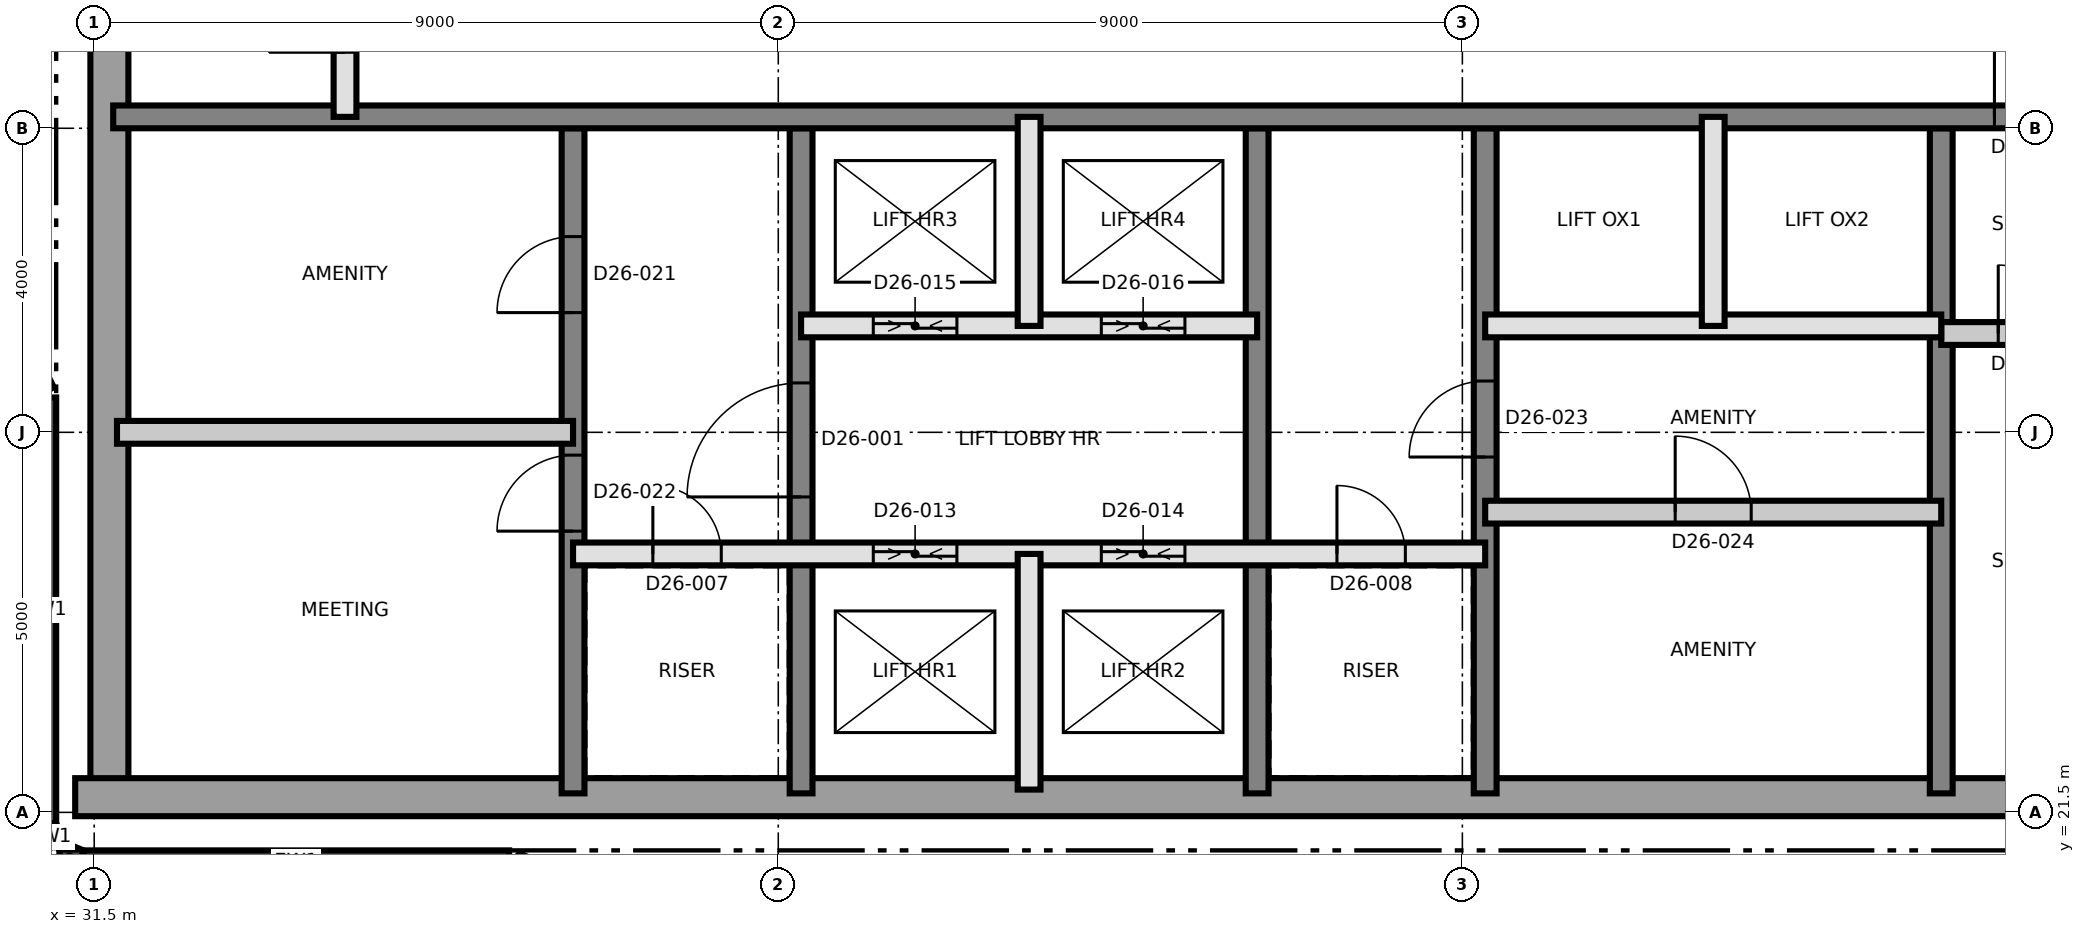
"""IFC4 building model, lengths in metres.
Left out: names, types, materials, properties, quantities, classifications, styles, units other than length and angle.
Written with IfcOpenShell. Run it as: python <this file> out.ifc"""

import sys

from ifc_helpers import new_model, si_unit, direction, frame, frame_2d, origin, place, context, subcontext, project, spatial, rectangle, extrude, element, fill, save


model = new_model("IFC4")
c1 = context("Model", 3, precision=1e-05, world=origin(), true_north=direction((0.0, 1.0)))
c2 = subcontext(c1, "Body", "Model", "MODEL_VIEW")
j1 = project(units=[si_unit("LENGTHUNIT", "METRE"), si_unit("PLANEANGLEUNIT", "RADIAN")], contexts=[c1])
p1 = place(None, origin())
s1 = spatial("IfcSite", under=j1, at=p1, CompositionType="ELEMENT")
p2 = place(p1, origin())
s2 = spatial("IfcBuilding", under=s1, at=p2, CompositionType="ELEMENT")
p3 = place(p2, frame((0.0, 0.0, 232.8)))
s3 = spatial("IfcBuildingStorey", under=s2, at=p3, CompositionType="ELEMENT", Elevation=232.8)
p4 = place(p3, frame((31.7, 21.75, 0.0), z_axis=(0.0, 0.0, 1.0), x_axis=(0.0, 1.0, 0.0)))
e1 = element("IfcWall", 1, at=p4, inside=s3, PredefinedType="SHEAR", context=c2, shape_type="SweptSolid", body=[
    extrude(rectangle(XDim=17.5, YDim=0.5, at=frame_2d((8.75, 0.0))), origin(), (0.0, 0.0, 1.0), 3.7),
])
p5 = place(p3, frame((31.25, 21.7, 0.0), z_axis=(0.0, 0.0, 1.0), x_axis=(1.0, 0.0, 0.0)))
e2 = element("IfcWall", 2, at=p5, inside=s3, PredefinedType="SHEAR", context=c2, shape_type="SweptSolid", body=[
    extrude(rectangle(XDim=27.0, YDim=0.5, at=frame_2d((13.5, 0.0))), origin(), (0.0, 0.0, 1.0), 3.7),
])
p6 = place(p3, frame((37.8, 21.75, 0.0), z_axis=(0.0, 0.0, 1.0), x_axis=(0.0, 1.0, 0.0)))
e3 = element("IfcWall", 3, at=p6, inside=s3, PredefinedType="SHEAR", context=c2, shape_type="SweptSolid", body=[
    extrude(rectangle(XDim=8.75, YDim=0.3, at=frame_2d((4.375, 0.0))), origin(), (0.0, 0.0, 1.0), 3.7),
])
p7 = place(p6, frame((6.325, 0.0, 0.0)))
e4 = element("IfcOpeningElement", 4, at=p7, cuts=e3, PredefinedType="OPENING", context=c2, shape_type="SweptSolid", body=[
    extrude(rectangle(XDim=1.0, YDim=2.1, at=frame_2d((0.5, 1.05))), frame((0.0, 0.16, 0.0), z_axis=(0.0, -1.0, 0.0), x_axis=(1.0, 0.0, 0.0)), (0.0, 0.0, 1.0), 0.32),
])
p8 = place(p6, frame((3.45, 0.0, 0.0)))
e5 = element("IfcOpeningElement", 5, at=p8, cuts=e3, PredefinedType="OPENING", context=c2, shape_type="SweptSolid", body=[
    extrude(rectangle(XDim=1.0, YDim=2.1, at=frame_2d((0.5, 1.05))), frame((0.0, 0.16, 0.0), z_axis=(0.0, -1.0, 0.0), x_axis=(1.0, 0.0, 0.0)), (0.0, 0.0, 1.0), 0.32),
])
p9 = place(p3, frame((40.8, 21.75, 0.0), z_axis=(0.0, 0.0, 1.0), x_axis=(0.0, 1.0, 0.0)))
e6 = element("IfcWall", 6, at=p9, inside=s3, PredefinedType="SHEAR", context=c2, shape_type="SweptSolid", body=[
    extrude(rectangle(XDim=8.75, YDim=0.3, at=frame_2d((4.375, 0.0))), origin(), (0.0, 0.0, 1.0), 3.7),
])
p10 = place(p9, frame((3.9, 0.0, 0.0)))
e7 = element("IfcOpeningElement", 7, at=p10, cuts=e6, PredefinedType="OPENING", context=c2, shape_type="SweptSolid", body=[
    extrude(rectangle(XDim=1.5, YDim=2.1, at=frame_2d((0.75, 1.05))), frame((0.0, 0.16, 0.0), z_axis=(0.0, -1.0, 0.0), x_axis=(1.0, 0.0, 0.0)), (0.0, 0.0, 1.0), 0.32),
])
p11 = place(p3, frame((46.8, 21.75, 0.0), z_axis=(0.0, 0.0, 1.0), x_axis=(0.0, 1.0, 0.0)))
e8 = element("IfcWall", 8, at=p11, inside=s3, PredefinedType="SHEAR", context=c2, shape_type="SweptSolid", body=[
    extrude(rectangle(XDim=8.75, YDim=0.3, at=frame_2d((4.375, 0.0))), origin(), (0.0, 0.0, 1.0), 3.7),
])
p12 = place(p3, frame((49.8, 21.75, 0.0), z_axis=(0.0, 0.0, 1.0), x_axis=(0.0, 1.0, 0.0)))
e9 = element("IfcWall", 9, at=p12, inside=s3, PredefinedType="SHEAR", context=c2, shape_type="SweptSolid", body=[
    extrude(rectangle(XDim=8.75, YDim=0.3, at=frame_2d((4.375, 0.0))), origin(), (0.0, 0.0, 1.0), 3.7),
])
p13 = place(p12, frame((4.425, 0.0, 0.0)))
e10 = element("IfcOpeningElement", 10, at=p13, cuts=e9, PredefinedType="OPENING", context=c2, shape_type="SweptSolid", body=[
    extrude(rectangle(XDim=1.0, YDim=2.1, at=frame_2d((0.5, 1.05))), frame((0.0, 0.16, 0.0), z_axis=(0.0, -1.0, 0.0), x_axis=(1.0, 0.0, 0.0)), (0.0, 0.0, 1.0), 0.32),
])
p14 = place(p3, frame((55.8, 21.75, 0.0), z_axis=(0.0, 0.0, 1.0), x_axis=(0.0, 1.0, 0.0)))
e11 = element("IfcWall", 11, at=p14, inside=s3, PredefinedType="SHEAR", context=c2, shape_type="SweptSolid", body=[
    extrude(rectangle(XDim=8.75, YDim=0.3, at=frame_2d((4.375, 0.0))), origin(), (0.0, 0.0, 1.0), 3.7),
])
p15 = place(p3, frame((31.75, 30.65, 0.0), z_axis=(0.0, 0.0, 1.0), x_axis=(1.0, 0.0, 0.0)))
e12 = element("IfcWall", 12, at=p15, inside=s3, PredefinedType="SHEAR", context=c2, shape_type="SweptSolid", body=[
    extrude(rectangle(XDim=26.5, YDim=0.3, at=frame_2d((13.25, 0.0))), origin(), (0.0, 0.0, 1.0), 3.7),
])
p16 = place(p15, frame((24.75, 0.0, 0.0)))
e13 = element("IfcOpeningElement", 13, at=p16, cuts=e12, PredefinedType="OPENING", context=c2, shape_type="SweptSolid", body=[
    extrude(rectangle(XDim=1.0, YDim=2.1, at=frame_2d((0.5, 1.05))), frame((0.0, 0.16, 0.0), z_axis=(0.0, -1.0, 0.0), x_axis=(1.0, 0.0, 0.0)), (0.0, 0.0, 1.0), 0.32),
])
p17 = place(p3, frame((30.85, 26.959, 0.0), z_axis=(0.0, 0.0, 1.0), x_axis=(0.0, -1.0, 0.0)))
e14 = element("IfcWall", 14, at=p17, inside=s3, PredefinedType="SOLIDWALL", context=c2, shape_type="SweptSolid", body=[
    extrude(rectangle(XDim=5.599, YDim=0.3, at=frame_2d((2.8, 0.0))), origin(), (0.0, 0.0, 1.0), 3.4),
])
for number, where, z_axis, x_axis in (
    (15, (30.861, 21.302, 0.0), (0.0, 0.0, 1.0), (0.383, -0.924, 0.0)),
    (16, (31.048, 20.967, 0.0), (0.0, 0.0, 1.0), (0.924, -0.383, 0.0)),
):
    element("IfcWall", number, at=place(p3, frame(where, z_axis=z_axis, x_axis=x_axis)), inside=s3, PredefinedType="SOLIDWALL", context=c2, shape_type="SweptSolid", body=[
        extrude(rectangle(XDim=0.275, YDim=0.3, at=frame_2d((0.138, 0.0))), origin(), (0.0, 0.0, 1.0), 3.4),
    ])
p18 = place(p3, frame((31.36, 20.85, 0.0), z_axis=(0.0, 0.0, 1.0), x_axis=(1.0, 0.0, 0.0)))
e17 = element("IfcWall", 17, at=p18, inside=s3, PredefinedType="SOLIDWALL", context=c2, shape_type="SweptSolid", body=[
    extrude(rectangle(XDim=5.599, YDim=0.3, at=frame_2d((2.8, 0.0))), origin(), (0.0, 0.0, 1.0), 3.4),
])
for number, where, z_axis, x_axis in (
    (18, (37.025, 20.834, 0.0), (0.0, 0.0, 1.0), (0.897, -0.442, 0.0)),
    (19, (30.216, 28.28, 0.0), (0.0, 0.0, 1.0), (0.442, -0.897, 0.0)),
):
    element("IfcWall", number, at=place(p3, frame(where, z_axis=z_axis, x_axis=x_axis)), inside=s3, PredefinedType="SOLIDWALL", context=c2, shape_type="SweptSolid", body=[
        extrude(rectangle(XDim=1.399, YDim=0.3, at=frame_2d((0.7, 0.0))), origin(), (0.0, 0.0, 1.0), 3.4),
    ])
p19 = place(p3, frame((37.8, 24.9, 0.0), z_axis=(0.0, 0.0, 1.0), x_axis=(1.0, 0.0, 0.0)))
e20 = element("IfcWall", 20, at=p19, inside=s3, PredefinedType="SOLIDWALL", context=c2, shape_type="SweptSolid", body=[
    extrude(rectangle(XDim=12.0, YDim=0.3, at=frame_2d((6.0, 0.0))), origin(), (0.0, 0.0, 1.0), 3.4),
])
p20 = place(p19, frame((1.05, 0.0, 0.0)))
e21 = element("IfcOpeningElement", 21, at=p20, cuts=e20, PredefinedType="OPENING", context=c2, shape_type="SweptSolid", body=[
    extrude(rectangle(XDim=0.9, YDim=2.1, at=frame_2d((0.45, 1.05))), frame((0.0, 0.16, 0.0), z_axis=(0.0, -1.0, 0.0), x_axis=(1.0, 0.0, 0.0)), (0.0, 0.0, 1.0), 0.32),
])
p21 = place(p19, frame((10.05, 0.0, 0.0)))
e22 = element("IfcOpeningElement", 22, at=p21, cuts=e20, PredefinedType="OPENING", context=c2, shape_type="SweptSolid", body=[
    extrude(rectangle(XDim=0.9, YDim=2.1, at=frame_2d((0.45, 1.05))), frame((0.0, 0.16, 0.0), z_axis=(0.0, -1.0, 0.0), x_axis=(1.0, 0.0, 0.0)), (0.0, 0.0, 1.0), 0.32),
])
p22 = place(p19, frame((3.95, 0.0, 0.0)))
e23 = element("IfcOpeningElement", 23, at=p22, cuts=e20, PredefinedType="OPENING", context=c2, shape_type="SweptSolid", body=[
    extrude(rectangle(XDim=1.1, YDim=2.4, at=frame_2d((0.55, 1.2))), frame((0.0, 0.16, 0.0), z_axis=(0.0, -1.0, 0.0), x_axis=(1.0, 0.0, 0.0)), (0.0, 0.0, 1.0), 0.32),
])
p23 = place(p19, frame((6.95, 0.0, 0.0)))
e24 = element("IfcOpeningElement", 24, at=p23, cuts=e20, PredefinedType="OPENING", context=c2, shape_type="SweptSolid", body=[
    extrude(rectangle(XDim=1.1, YDim=2.4, at=frame_2d((0.55, 1.2))), frame((0.0, 0.16, 0.0), z_axis=(0.0, -1.0, 0.0), x_axis=(1.0, 0.0, 0.0)), (0.0, 0.0, 1.0), 0.32),
])
p24 = place(p3, frame((49.8, 25.45, 0.0), z_axis=(0.0, 0.0, 1.0), x_axis=(1.0, 0.0, 0.0)))
e25 = element("IfcWall", 25, at=p24, inside=s3, PredefinedType="PARTITIONING", context=c2, shape_type="SweptSolid", body=[
    extrude(rectangle(XDim=6.0, YDim=0.3, at=frame_2d((3.0, 0.0))), origin(), (0.0, 0.0, 1.0), 3.4),
])
p25 = place(p24, frame((2.5, 0.0, 0.0)))
e26 = element("IfcOpeningElement", 26, at=p25, cuts=e25, PredefinedType="OPENING", context=c2, shape_type="SweptSolid", body=[
    extrude(rectangle(XDim=1.0, YDim=2.1, at=frame_2d((0.5, 1.05))), frame((0.0, 0.16, 0.0), z_axis=(0.0, -1.0, 0.0), x_axis=(1.0, 0.0, 0.0)), (0.0, 0.0, 1.0), 0.32),
])
p26 = place(p3, frame((31.8, 26.5, 0.0), z_axis=(0.0, 0.0, 1.0), x_axis=(1.0, 0.0, 0.0)))
e27 = element("IfcWall", 27, at=p26, inside=s3, PredefinedType="PARTITIONING", context=c2, shape_type="SweptSolid", body=[
    extrude(rectangle(XDim=6.0, YDim=0.3, at=frame_2d((3.0, 0.0))), origin(), (0.0, 0.0, 1.0), 3.4),
])
p27 = place(p3, frame((55.8, 27.8, 0.0), z_axis=(0.0, 0.0, 1.0), x_axis=(1.0, 0.0, 0.0)))
e28 = element("IfcWall", 28, at=p27, inside=s3, PredefinedType="PARTITIONING", context=c2, shape_type="SweptSolid", body=[
    extrude(rectangle(XDim=2.4, YDim=0.3, at=frame_2d((1.2, 0.0))), origin(), (0.0, 0.0, 1.0), 3.4),
])
p28 = place(p27, frame((0.75, 0.0, 0.0)))
e29 = element("IfcOpeningElement", 29, at=p28, cuts=e28, PredefinedType="OPENING", context=c2, shape_type="SweptSolid", body=[
    extrude(rectangle(XDim=0.9, YDim=2.1, at=frame_2d((0.45, 1.05))), frame((0.0, 0.16, 0.0), z_axis=(0.0, -1.0, 0.0), x_axis=(1.0, 0.0, 0.0)), (0.0, 0.0, 1.0), 0.32),
])
p29 = place(p3, frame((40.8, 27.9, 0.0), z_axis=(0.0, 0.0, 1.0), x_axis=(1.0, 0.0, 0.0)))
e30 = element("IfcWall", 30, at=p29, inside=s3, PredefinedType="SOLIDWALL", context=c2, shape_type="SweptSolid", body=[
    extrude(rectangle(XDim=6.0, YDim=0.3, at=frame_2d((3.0, 0.0))), origin(), (0.0, 0.0, 1.0), 3.4),
])
p30 = place(p29, frame((0.95, 0.0, 0.0)))
e31 = element("IfcOpeningElement", 31, at=p30, cuts=e30, PredefinedType="OPENING", context=c2, shape_type="SweptSolid", body=[
    extrude(rectangle(XDim=1.1, YDim=2.4, at=frame_2d((0.55, 1.2))), frame((0.0, 0.16, 0.0), z_axis=(0.0, -1.0, 0.0), x_axis=(1.0, 0.0, 0.0)), (0.0, 0.0, 1.0), 0.32),
])
p31 = place(p29, frame((3.95, 0.0, 0.0)))
e32 = element("IfcOpeningElement", 32, at=p31, cuts=e30, PredefinedType="OPENING", context=c2, shape_type="SweptSolid", body=[
    extrude(rectangle(XDim=1.1, YDim=2.4, at=frame_2d((0.55, 1.2))), frame((0.0, 0.16, 0.0), z_axis=(0.0, -1.0, 0.0), x_axis=(1.0, 0.0, 0.0)), (0.0, 0.0, 1.0), 0.32),
])
p32 = place(p3, frame((49.8, 27.9, 0.0), z_axis=(0.0, 0.0, 1.0), x_axis=(1.0, 0.0, 0.0)))
e33 = element("IfcWall", 33, at=p32, inside=s3, PredefinedType="SOLIDWALL", context=c2, shape_type="SweptSolid", body=[
    extrude(rectangle(XDim=6.0, YDim=0.3, at=frame_2d((3.0, 0.0))), origin(), (0.0, 0.0, 1.0), 3.4),
])
p33 = place(p3, frame((34.8, 30.65, 0.0), z_axis=(0.0, 0.0, 1.0), x_axis=(0.0, 1.0, 0.0)))
e34 = element("IfcWall", 34, at=p33, inside=s3, PredefinedType="SOLIDWALL", context=c2, shape_type="SweptSolid", body=[
    extrude(rectangle(XDim=2.7, YDim=0.3, at=frame_2d((1.35, 0.0))), origin(), (0.0, 0.0, 1.0), 3.4),
])
p34 = place(p33, frame((0.85, 0.0, 0.0)))
e35 = element("IfcOpeningElement", 35, at=p34, cuts=e34, PredefinedType="OPENING", context=c2, shape_type="SweptSolid", body=[
    extrude(rectangle(XDim=1.0, YDim=2.1, at=frame_2d((0.5, 1.05))), frame((0.0, 0.16, 0.0), z_axis=(0.0, -1.0, 0.0), x_axis=(1.0, 0.0, 0.0)), (0.0, 0.0, 1.0), 0.32),
])
p35 = place(p3, frame((43.8, 21.8, 0.0), z_axis=(0.0, 0.0, 1.0), x_axis=(0.0, 1.0, 0.0)))
e36 = element("IfcWall", 36, at=p35, inside=s3, PredefinedType="SOLIDWALL", context=c2, shape_type="SweptSolid", body=[
    extrude(rectangle(XDim=3.1, YDim=0.3, at=frame_2d((1.55, 0.0))), origin(), (0.0, 0.0, 1.0), 3.4),
])
for number, where, z_axis, x_axis in (
    (37, (43.8, 27.9, 0.0), (0.0, 0.0, 1.0), (0.0, 1.0, 0.0)),
    (38, (52.8, 27.9, 0.0), (0.0, 0.0, 1.0), (0.0, 1.0, 0.0)),
):
    element("IfcWall", number, at=place(p3, frame(where, z_axis=z_axis, x_axis=x_axis)), inside=s3, PredefinedType="SOLIDWALL", context=c2, shape_type="SweptSolid", body=[
        extrude(rectangle(XDim=2.75, YDim=0.3, at=frame_2d((1.375, 0.0))), origin(), (0.0, 0.0, 1.0), 3.4),
    ])
p36 = place(p10, origin())
e39 = element("IfcDoor", 39, at=p36, inside=s3, OperationType="SINGLE_SWING_RIGHT", PredefinedType="DOOR", context=c2, shape_type="SweptSolid", body=[
    extrude(rectangle(XDim=1.5, YDim=2.1, at=frame_2d((0.75, 1.05))), frame((0.0, 0.025, 0.0), z_axis=(0.0, -1.0, 0.0), x_axis=(1.0, 0.0, 0.0)), (0.0, 0.0, 1.0), 0.05),
])
fill(e7, e39)
p37 = place(p20, origin())
e40 = element("IfcDoor", 40, at=p37, inside=s3, OperationType="SINGLE_SWING_LEFT", PredefinedType="DOOR", context=c2, shape_type="SweptSolid", body=[
    extrude(rectangle(XDim=0.9, YDim=2.1, at=frame_2d((0.45, 1.05))), frame((0.0, 0.025, 0.0), z_axis=(0.0, -1.0, 0.0), x_axis=(1.0, 0.0, 0.0)), (0.0, 0.0, 1.0), 0.05),
])
fill(e21, e40)
p38 = place(p21, origin())
e41 = element("IfcDoor", 41, at=p38, inside=s3, OperationType="SINGLE_SWING_RIGHT", PredefinedType="DOOR", context=c2, shape_type="SweptSolid", body=[
    extrude(rectangle(XDim=0.9, YDim=2.1, at=frame_2d((0.45, 1.05))), frame((0.0, 0.025, 0.0), z_axis=(0.0, -1.0, 0.0), x_axis=(1.0, 0.0, 0.0)), (0.0, 0.0, 1.0), 0.05),
])
fill(e22, e41)
p39 = place(p16, origin())
e42 = element("IfcDoor", 42, at=p39, inside=s3, OperationType="SINGLE_SWING_LEFT", PredefinedType="DOOR", context=c2, shape_type="SweptSolid", body=[
    extrude(rectangle(XDim=1.0, YDim=2.1, at=frame_2d((0.5, 1.05))), frame((0.0, 0.025, 0.0), z_axis=(0.0, -1.0, 0.0), x_axis=(1.0, 0.0, 0.0)), (0.0, 0.0, 1.0), 0.05),
])
fill(e13, e42)
p40 = place(p28, origin())
e43 = element("IfcDoor", 43, at=p40, inside=s3, OperationType="SINGLE_SWING_RIGHT", PredefinedType="DOOR", context=c2, shape_type="SweptSolid", body=[
    extrude(rectangle(XDim=0.9, YDim=2.1, at=frame_2d((0.45, 1.05))), frame((0.0, 0.025, 0.0), z_axis=(0.0, -1.0, 0.0), x_axis=(1.0, 0.0, 0.0)), (0.0, 0.0, 1.0), 0.05),
])
fill(e29, e43)
p41 = place(p22, origin())
e44 = element("IfcDoor", 44, at=p41, inside=s3, OperationType="SLIDING_TO_LEFT", PredefinedType="DOOR", context=c2, shape_type="SweptSolid", body=[
    extrude(rectangle(XDim=1.1, YDim=2.4, at=frame_2d((0.55, 1.2))), frame((0.0, 0.025, 0.0), z_axis=(0.0, -1.0, 0.0), x_axis=(1.0, 0.0, 0.0)), (0.0, 0.0, 1.0), 0.05),
])
fill(e23, e44)
p42 = place(p23, origin())
e45 = element("IfcDoor", 45, at=p42, inside=s3, OperationType="SLIDING_TO_LEFT", PredefinedType="DOOR", context=c2, shape_type="SweptSolid", body=[
    extrude(rectangle(XDim=1.1, YDim=2.4, at=frame_2d((0.55, 1.2))), frame((0.0, 0.025, 0.0), z_axis=(0.0, -1.0, 0.0), x_axis=(1.0, 0.0, 0.0)), (0.0, 0.0, 1.0), 0.05),
])
fill(e24, e45)
p43 = place(p30, origin())
e46 = element("IfcDoor", 46, at=p43, inside=s3, OperationType="SLIDING_TO_LEFT", PredefinedType="DOOR", context=c2, shape_type="SweptSolid", body=[
    extrude(rectangle(XDim=1.1, YDim=2.4, at=frame_2d((0.55, 1.2))), frame((0.0, 0.025, 0.0), z_axis=(0.0, -1.0, 0.0), x_axis=(1.0, 0.0, 0.0)), (0.0, 0.0, 1.0), 0.05),
])
fill(e31, e46)
p44 = place(p31, origin())
e47 = element("IfcDoor", 47, at=p44, inside=s3, OperationType="SLIDING_TO_LEFT", PredefinedType="DOOR", context=c2, shape_type="SweptSolid", body=[
    extrude(rectangle(XDim=1.1, YDim=2.4, at=frame_2d((0.55, 1.2))), frame((0.0, 0.025, 0.0), z_axis=(0.0, -1.0, 0.0), x_axis=(1.0, 0.0, 0.0)), (0.0, 0.0, 1.0), 0.05),
])
fill(e32, e47)
p45 = place(p7, origin())
e48 = element("IfcDoor", 48, at=p45, inside=s3, OperationType="SINGLE_SWING_LEFT", PredefinedType="DOOR", context=c2, shape_type="SweptSolid", body=[
    extrude(rectangle(XDim=1.0, YDim=2.1, at=frame_2d((0.5, 1.05))), frame((0.0, 0.025, 0.0), z_axis=(0.0, -1.0, 0.0), x_axis=(1.0, 0.0, 0.0)), (0.0, 0.0, 1.0), 0.05),
])
fill(e4, e48)
p46 = place(p8, origin())
e49 = element("IfcDoor", 49, at=p46, inside=s3, OperationType="SINGLE_SWING_RIGHT", PredefinedType="DOOR", context=c2, shape_type="SweptSolid", body=[
    extrude(rectangle(XDim=1.0, YDim=2.1, at=frame_2d((0.5, 1.05))), frame((0.0, 0.025, 0.0), z_axis=(0.0, -1.0, 0.0), x_axis=(1.0, 0.0, 0.0)), (0.0, 0.0, 1.0), 0.05),
])
fill(e5, e49)
p47 = place(p13, origin())
e50 = element("IfcDoor", 50, at=p47, inside=s3, OperationType="SINGLE_SWING_LEFT", PredefinedType="DOOR", context=c2, shape_type="SweptSolid", body=[
    extrude(rectangle(XDim=1.0, YDim=2.1, at=frame_2d((0.5, 1.05))), frame((0.0, 0.025, 0.0), z_axis=(0.0, -1.0, 0.0), x_axis=(1.0, 0.0, 0.0)), (0.0, 0.0, 1.0), 0.05),
])
fill(e10, e50)
p48 = place(p25, origin())
e51 = element("IfcDoor", 51, at=p48, inside=s3, OperationType="SINGLE_SWING_RIGHT", PredefinedType="DOOR", context=c2, shape_type="SweptSolid", body=[
    extrude(rectangle(XDim=1.0, YDim=2.1, at=frame_2d((0.5, 1.05))), frame((0.0, 0.025, 0.0), z_axis=(0.0, -1.0, 0.0), x_axis=(1.0, 0.0, 0.0)), (0.0, 0.0, 1.0), 0.05),
])
fill(e26, e51)
save(model, sys.argv[1])
